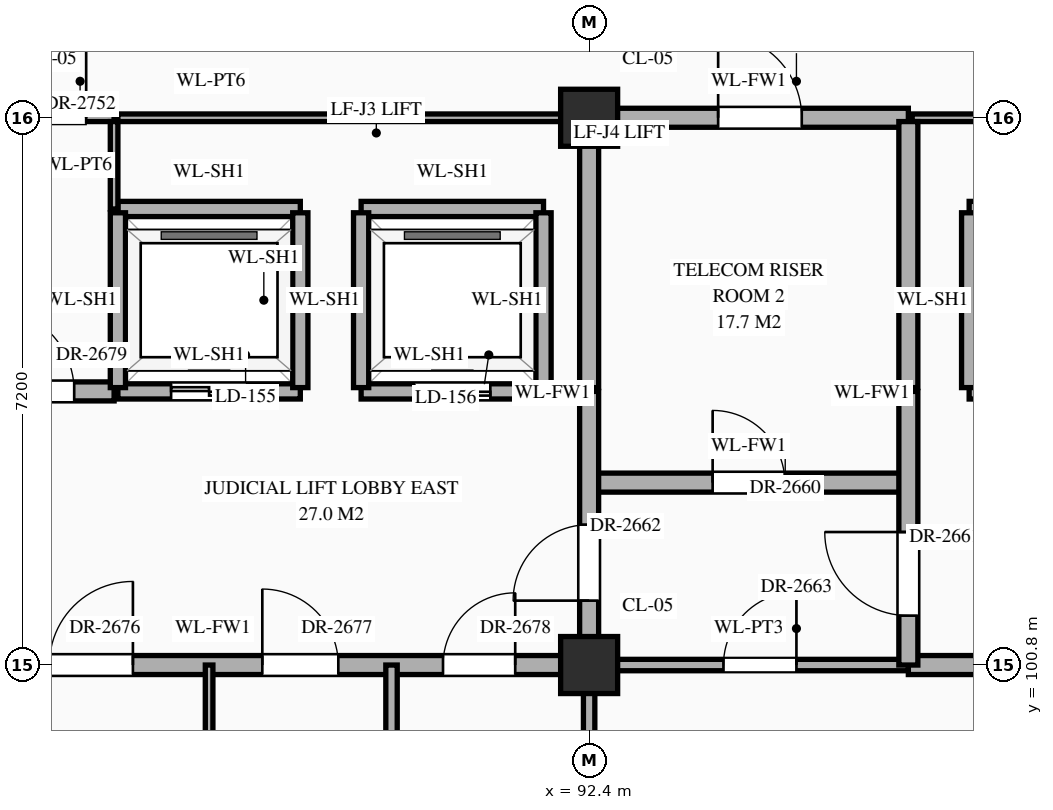
"""IFC4 building model, lengths in metres.
Left out: names, types, materials, properties, quantities, classifications, styles, units other than length and angle.
Written with IfcOpenShell. Run it as: python <this file> out.ifc"""

import sys

from ifc_helpers import new_model, si_unit, direction, frame, frame_2d, origin, origin_2d, place, context, subcontext, project, spatial, rectangle, extrude, element, fill, save


model = new_model("IFC4")
c1 = context("Model", 3, precision=1e-05, world=origin(), true_north=direction((0.0, 1.0)))
c2 = subcontext(c1, "Body", "Model", "MODEL_VIEW")
j1 = project(units=[si_unit("LENGTHUNIT", "METRE"), si_unit("PLANEANGLEUNIT", "RADIAN")], contexts=[c1])
p1 = place(None, origin())
s1 = spatial("IfcSite", under=j1, at=p1, CompositionType="ELEMENT")
p2 = place(p1, origin())
s2 = spatial("IfcBuilding", under=s1, at=p2, CompositionType="ELEMENT")
p3 = place(p2, frame((0.0, 0.0, 39.3)))
s3 = spatial("IfcBuildingStorey", under=s2, at=p3, CompositionType="ELEMENT", Elevation=39.3)
for number, where, z_axis, x_axis in (
    (1, (92.4, 100.8, 0.0), (0.0, 0.0, 1.0), (1.0, 0.0, 0.0)),
    (2, (92.4, 108.0, 0.0), (0.0, 0.0, 1.0), (1.0, 0.0, 0.0)),
):
    element("IfcColumn", number, at=place(p3, frame(where, z_axis=z_axis, x_axis=x_axis)), inside=s3, PredefinedType="COLUMN", context=c2, shape_type="SweptSolid", body=[
        extrude(rectangle(XDim=0.75, YDim=0.75, at=origin_2d()), origin(), (0.0, 0.0, 1.0), 4.2),
    ])
p4 = place(p3, frame((75.6, 100.8, 0.0), z_axis=(0.0, 0.0, 1.0), x_axis=(1.0, 0.0, 0.0)))
e3 = element("IfcWall", 3, at=p4, inside=s3, PredefinedType="STANDARD", context=c2, shape_type="SweptSolid", body=[
    extrude(rectangle(XDim=16.8, YDim=0.25, at=frame_2d((8.4, 0.0))), origin(), (0.0, 0.0, 1.0), 3.1),
])
p5 = place(p4, frame((3.7, 0.0, 0.0)))
e4 = element("IfcOpeningElement", 4, at=p5, cuts=e3, PredefinedType="OPENING", context=c2, shape_type="SweptSolid", body=[
    extrude(rectangle(XDim=1.0, YDim=2.2, at=frame_2d((0.5, 1.1))), frame((0.0, 0.137, 0.0), z_axis=(0.0, -1.0, 0.0), x_axis=(1.0, 0.0, 0.0)), (0.0, 0.0, 1.0), 0.274),
])
p6 = place(p4, frame((9.698, 0.0, 0.0)))
e5 = element("IfcOpeningElement", 5, at=p6, cuts=e3, PredefinedType="OPENING", context=c2, shape_type="SweptSolid", body=[
    extrude(rectangle(XDim=1.1, YDim=2.2, at=frame_2d((0.55, 1.1))), frame((0.0, 0.137, 0.0), z_axis=(0.0, -1.0, 0.0), x_axis=(1.0, 0.0, 0.0)), (0.0, 0.0, 1.0), 0.274),
])
p7 = place(p4, frame((12.5, 0.0, 0.0)))
e6 = element("IfcOpeningElement", 6, at=p7, cuts=e3, PredefinedType="OPENING", context=c2, shape_type="SweptSolid", body=[
    extrude(rectangle(XDim=1.0, YDim=2.2, at=frame_2d((0.5, 1.1))), frame((0.0, 0.137, 0.0), z_axis=(0.0, -1.0, 0.0), x_axis=(1.0, 0.0, 0.0)), (0.0, 0.0, 1.0), 0.274),
])
p8 = place(p4, frame((14.877, 0.0, 0.0)))
e7 = element("IfcOpeningElement", 7, at=p8, cuts=e3, PredefinedType="OPENING", context=c2, shape_type="SweptSolid", body=[
    extrude(rectangle(XDim=0.95, YDim=2.15, at=frame_2d((0.475, 1.075))), frame((0.0, 0.137, 0.0), z_axis=(0.0, -1.0, 0.0), x_axis=(1.0, 0.0, 0.0)), (0.0, 0.0, 1.0), 0.274),
])
p9 = place(p3, frame((92.4, 100.8, 0.0), z_axis=(0.0, 0.0, 1.0), x_axis=(1.0, 0.0, 0.0)))
e8 = element("IfcWall", 8, at=p9, inside=s3, PredefinedType="STANDARD", context=c2, shape_type="SweptSolid", body=[
    extrude(rectangle(XDim=4.2, YDim=0.15, at=frame_2d((2.1, 0.0))), origin(), (0.0, 0.0, 1.0), 3.1),
])
p10 = place(p9, frame((1.768, 0.0, 0.0)))
e9 = element("IfcOpeningElement", 9, at=p10, cuts=e8, PredefinedType="OPENING", context=c2, shape_type="SweptSolid", body=[
    extrude(rectangle(XDim=0.96, YDim=2.2, at=frame_2d((0.48, 1.1))), frame((0.0, 0.087, 0.0), z_axis=(0.0, -1.0, 0.0), x_axis=(1.0, 0.0, 0.0)), (0.0, 0.0, 1.0), 0.174),
])
p11 = place(p3, frame((96.6, 100.8, 0.0), z_axis=(0.0, 0.0, 1.0), x_axis=(1.0, 0.0, 0.0)))
e10 = element("IfcWall", 10, at=p11, inside=s3, PredefinedType="STANDARD", context=c2, shape_type="SweptSolid", body=[
    extrude(rectangle(XDim=12.6, YDim=0.25, at=frame_2d((6.3, 0.0))), origin(), (0.0, 0.0, 1.0), 3.1),
])
p12 = place(p11, frame((7.9, 0.0, 0.0)))
e11 = element("IfcOpeningElement", 11, at=p12, cuts=e10, PredefinedType="OPENING", context=c2, shape_type="SweptSolid", body=[
    extrude(rectangle(XDim=1.0, YDim=2.2, at=frame_2d((0.5, 1.1))), frame((0.0, 0.137, 0.0), z_axis=(0.0, -1.0, 0.0), x_axis=(1.0, 0.0, 0.0)), (0.0, 0.0, 1.0), 0.274),
])
p13 = place(p3, frame((92.4, 103.2, 0.0), z_axis=(0.0, 0.0, 1.0), x_axis=(1.0, 0.0, 0.0)))
e12 = element("IfcWall", 12, at=p13, inside=s3, PredefinedType="STANDARD", context=c2, shape_type="SweptSolid", body=[
    extrude(rectangle(XDim=4.2, YDim=0.25, at=frame_2d((2.1, 0.0))), origin(), (0.0, 0.0, 1.0), 3.95),
])
p14 = place(p13, frame((1.625, 0.0, 0.0)))
e13 = element("IfcOpeningElement", 13, at=p14, cuts=e12, PredefinedType="OPENING", context=c2, shape_type="SweptSolid", body=[
    extrude(rectangle(XDim=0.95, YDim=2.15, at=frame_2d((0.475, 1.075))), frame((0.0, 0.137, 0.0), z_axis=(0.0, -1.0, 0.0), x_axis=(1.0, 0.0, 0.0)), (0.0, 0.0, 1.0), 0.274),
])
p15 = place(p3, frame((81.85, 104.4, 0.0), z_axis=(0.0, 0.0, 1.0), x_axis=(1.0, 0.0, 0.0)))
e14 = element("IfcWall", 14, at=p15, inside=s3, PredefinedType="STANDARD", context=c2, shape_type="SweptSolid", body=[
    extrude(rectangle(XDim=4.3, YDim=0.25, at=frame_2d((2.15, 0.0))), origin(), (0.0, 0.0, 1.0), 3.95),
])
p16 = place(p15, frame((0.6, 0.0, 0.0)))
e15 = element("IfcOpeningElement", 15, at=p16, cuts=e14, PredefinedType="OPENING", context=c2, shape_type="SweptSolid", body=[
    extrude(rectangle(XDim=0.95, YDim=2.15, at=frame_2d((0.475, 1.075))), frame((0.0, 0.137, 0.0), z_axis=(0.0, -1.0, 0.0), x_axis=(1.0, 0.0, 0.0)), (0.0, 0.0, 1.0), 0.274),
])
p17 = place(p15, frame((2.675, 0.0, 0.0)))
e16 = element("IfcOpeningElement", 16, at=p17, cuts=e14, PredefinedType="OPENING", context=c2, shape_type="SweptSolid", body=[
    extrude(rectangle(XDim=1.1, YDim=2.2, at=frame_2d((0.55, 1.1))), frame((0.0, 0.137, 0.0), z_axis=(0.0, -1.0, 0.0), x_axis=(1.0, 0.0, 0.0)), (0.0, 0.0, 1.0), 0.274),
])
p18 = place(p3, frame((86.2, 104.4, 0.0), z_axis=(0.0, 0.0, 1.0), x_axis=(1.0, 0.0, 0.0)))
e17 = element("IfcWall", 17, at=p18, inside=s3, PredefinedType="STANDARD", context=c2, shape_type="SweptSolid", body=[
    extrude(rectangle(XDim=2.4, YDim=0.2, at=frame_2d((1.2, 0.0))), origin(), (0.0, 0.0, 1.0), 3.95),
])
p19 = place(p18, frame((0.7, 0.0, 0.0)))
e18 = element("IfcOpeningElement", 18, at=p19, cuts=e17, PredefinedType="OPENING", context=c2, shape_type="SweptSolid", body=[
    extrude(rectangle(XDim=1.0, YDim=2.15, at=frame_2d((0.5, 1.075))), frame((0.0, 0.112, 0.0), z_axis=(0.0, -1.0, 0.0), x_axis=(1.0, 0.0, 0.0)), (0.0, 0.0, 1.0), 0.224),
])
p20 = place(p3, frame((89.4, 104.4, 0.0), z_axis=(0.0, 0.0, 1.0), x_axis=(1.0, 0.0, 0.0)))
e19 = element("IfcWall", 19, at=p20, inside=s3, PredefinedType="STANDARD", context=c2, shape_type="SweptSolid", body=[
    extrude(rectangle(XDim=2.4, YDim=0.2, at=frame_2d((1.2, 0.0))), origin(), (0.0, 0.0, 1.0), 3.95),
])
p21 = place(p20, frame((0.7, 0.0, 0.0)))
e20 = element("IfcOpeningElement", 20, at=p21, cuts=e19, PredefinedType="OPENING", context=c2, shape_type="SweptSolid", body=[
    extrude(rectangle(XDim=1.0, YDim=2.15, at=frame_2d((0.5, 1.075))), frame((0.0, 0.112, 0.0), z_axis=(0.0, -1.0, 0.0), x_axis=(1.0, 0.0, 0.0)), (0.0, 0.0, 1.0), 0.224),
])
p22 = place(p3, frame((97.4, 104.4, 0.0), z_axis=(0.0, 0.0, 1.0), x_axis=(1.0, 0.0, 0.0)))
e21 = element("IfcWall", 21, at=p22, inside=s3, PredefinedType="STANDARD", context=c2, shape_type="SweptSolid", body=[
    extrude(rectangle(XDim=3.0, YDim=0.2, at=frame_2d((1.5, 0.0))), origin(), (0.0, 0.0, 1.0), 3.95),
])
p23 = place(p22, frame((0.9, 0.0, 0.0)))
e22 = element("IfcOpeningElement", 22, at=p23, cuts=e21, PredefinedType="OPENING", context=c2, shape_type="SweptSolid", body=[
    extrude(rectangle(XDim=1.2, YDim=2.15, at=frame_2d((0.6, 1.075))), frame((0.0, 0.112, 0.0), z_axis=(0.0, -1.0, 0.0), x_axis=(1.0, 0.0, 0.0)), (0.0, 0.0, 1.0), 0.224),
])
for number, where, z_axis, x_axis in (
    (23, (86.2, 106.8, 0.0), (0.0, 0.0, 1.0), (1.0, 0.0, 0.0)),
    (24, (89.4, 106.8, 0.0), (0.0, 0.0, 1.0), (1.0, 0.0, 0.0)),
):
    element("IfcWall", number, at=place(p3, frame(where, z_axis=z_axis, x_axis=x_axis)), inside=s3, PredefinedType="STANDARD", context=c2, shape_type="SweptSolid", body=[
        extrude(rectangle(XDim=2.4, YDim=0.2, at=frame_2d((1.2, 0.0))), origin(), (0.0, 0.0, 1.0), 3.95),
    ])
p24 = place(p3, frame((97.4, 106.8, 0.0), z_axis=(0.0, 0.0, 1.0), x_axis=(1.0, 0.0, 0.0)))
e25 = element("IfcWall", 25, at=p24, inside=s3, PredefinedType="STANDARD", context=c2, shape_type="SweptSolid", body=[
    extrude(rectangle(XDim=3.0, YDim=0.2, at=frame_2d((1.5, 0.0))), origin(), (0.0, 0.0, 1.0), 3.95),
])
p25 = place(p3, frame((81.85, 108.0, 0.0), z_axis=(0.0, 0.0, 1.0), x_axis=(1.0, 0.0, 0.0)))
e26 = element("IfcWall", 26, at=p25, inside=s3, PredefinedType="STANDARD", context=c2, shape_type="SweptSolid", body=[
    extrude(rectangle(XDim=4.3, YDim=0.1, at=frame_2d((2.15, 0.0))), origin(), (0.0, 0.0, 1.0), 3.1),
])
p26 = place(p25, frame((0.387, 0.0, 0.0)))
e27 = element("IfcOpeningElement", 27, at=p26, cuts=e26, PredefinedType="OPENING", context=c2, shape_type="SweptSolid", body=[
    extrude(rectangle(XDim=1.08, YDim=2.25, at=frame_2d((0.54, 1.125))), frame((0.0, 0.062, 0.0), z_axis=(0.0, -1.0, 0.0), x_axis=(1.0, 0.0, 0.0)), (0.0, 0.0, 1.0), 0.124),
])
p27 = place(p25, frame((2.812, 0.0, 0.0)))
e28 = element("IfcOpeningElement", 28, at=p27, cuts=e26, PredefinedType="OPENING", context=c2, shape_type="SweptSolid", body=[
    extrude(rectangle(XDim=1.12, YDim=2.25, at=frame_2d((0.56, 1.125))), frame((0.0, 0.062, 0.0), z_axis=(0.0, -1.0, 0.0), x_axis=(1.0, 0.0, 0.0)), (0.0, 0.0, 1.0), 0.124),
])
p28 = place(p3, frame((86.2, 108.0, 0.0), z_axis=(0.0, 0.0, 1.0), x_axis=(1.0, 0.0, 0.0)))
e29 = element("IfcWall", 29, at=p28, inside=s3, PredefinedType="STANDARD", context=c2, shape_type="SweptSolid", body=[
    extrude(rectangle(XDim=6.15, YDim=0.1, at=frame_2d((3.075, 0.0))), origin(), (0.0, 0.0, 1.0), 3.1),
])
p29 = place(p3, frame((92.4, 108.0, 0.0), z_axis=(0.0, 0.0, 1.0), x_axis=(1.0, 0.0, 0.0)))
e30 = element("IfcWall", 30, at=p29, inside=s3, PredefinedType="STANDARD", context=c2, shape_type="SweptSolid", body=[
    extrude(rectangle(XDim=4.2, YDim=0.25, at=frame_2d((2.1, 0.0))), origin(), (0.0, 0.0, 1.0), 3.1),
])
p30 = place(p29, frame((1.698, 0.0, 0.0)))
e31 = element("IfcOpeningElement", 31, at=p30, cuts=e30, PredefinedType="OPENING", context=c2, shape_type="SweptSolid", body=[
    extrude(rectangle(XDim=1.1, YDim=2.2, at=frame_2d((0.55, 1.1))), frame((0.0, 0.137, 0.0), z_axis=(0.0, -1.0, 0.0), x_axis=(1.0, 0.0, 0.0)), (0.0, 0.0, 1.0), 0.274),
])
p31 = place(p3, frame((96.65, 108.0, 0.0), z_axis=(0.0, 0.0, 1.0), x_axis=(1.0, 0.0, 0.0)))
e32 = element("IfcWall", 32, at=p31, inside=s3, PredefinedType="STANDARD", context=c2, shape_type="SweptSolid", body=[
    extrude(rectangle(XDim=4.1, YDim=0.1, at=frame_2d((2.05, 0.0))), origin(), (0.0, 0.0, 1.0), 3.1),
])
p32 = place(p3, frame((86.15, 106.8, 0.0), z_axis=(0.0, 0.0, 1.0), x_axis=(0.0, 1.0, 0.0)))
e33 = element("IfcWall", 33, at=p32, inside=s3, PredefinedType="STANDARD", context=c2, shape_type="SweptSolid", body=[
    extrude(rectangle(XDim=1.15, YDim=0.1, at=frame_2d((0.575, 0.0))), origin(), (0.0, 0.0, 1.0), 3.95),
])
p33 = place(p3, frame((86.2, 104.45, 0.0), z_axis=(0.0, 0.0, 1.0), x_axis=(0.0, 1.0, 0.0)))
e34 = element("IfcWall", 34, at=p33, inside=s3, PredefinedType="STANDARD", context=c2, shape_type="SweptSolid", body=[
    extrude(rectangle(XDim=2.3, YDim=0.2, at=frame_2d((1.15, 0.0))), origin(), (0.0, 0.0, 1.0), 3.95),
])
p34 = place(p3, frame((87.4, 96.0, 0.0), z_axis=(0.0, 0.0, 1.0), x_axis=(0.0, 1.0, 0.0)))
e35 = element("IfcWall", 35, at=p34, inside=s3, PredefinedType="STANDARD", context=c2, shape_type="SweptSolid", body=[
    extrude(rectangle(XDim=4.8, YDim=0.1, at=frame_2d((2.4, 0.0))), origin(), (0.0, 0.0, 1.0), 3.95),
])
p35 = place(p34, frame((1.92, 0.0, 0.0)))
e36 = element("IfcOpeningElement", 36, at=p35, cuts=e35, PredefinedType="OPENING", context=c2, shape_type="SweptSolid", body=[
    extrude(rectangle(XDim=0.96, YDim=2.2, at=frame_2d((0.48, 1.1))), frame((0.0, 0.062, 0.0), z_axis=(0.0, -1.0, 0.0), x_axis=(1.0, 0.0, 0.0)), (0.0, 0.0, 1.0), 0.124),
])
for number, where, z_axis, x_axis in (
    (37, (88.6, 104.45, 0.0), (0.0, 0.0, 1.0), (0.0, 1.0, 0.0)),
    (38, (89.4, 104.45, 0.0), (0.0, 0.0, 1.0), (0.0, 1.0, 0.0)),
):
    element("IfcWall", number, at=place(p3, frame(where, z_axis=z_axis, x_axis=x_axis)), inside=s3, PredefinedType="STANDARD", context=c2, shape_type="SweptSolid", body=[
        extrude(rectangle(XDim=2.3, YDim=0.2, at=frame_2d((1.15, 0.0))), origin(), (0.0, 0.0, 1.0), 3.95),
    ])
p36 = place(p3, frame((89.8, 96.0, 0.0), z_axis=(0.0, 0.0, 1.0), x_axis=(0.0, 1.0, 0.0)))
e39 = element("IfcWall", 39, at=p36, inside=s3, PredefinedType="STANDARD", context=c2, shape_type="SweptSolid", body=[
    extrude(rectangle(XDim=4.8, YDim=0.15, at=frame_2d((2.4, 0.0))), origin(), (0.0, 0.0, 1.0), 3.95),
])
p37 = place(p36, frame((1.9, 0.0, 0.0)))
e40 = element("IfcOpeningElement", 40, at=p37, cuts=e39, PredefinedType="OPENING", context=c2, shape_type="SweptSolid", body=[
    extrude(rectangle(XDim=1.0, YDim=2.25, at=frame_2d((0.5, 1.125))), frame((0.0, 0.087, 0.0), z_axis=(0.0, -1.0, 0.0), x_axis=(1.0, 0.0, 0.0)), (0.0, 0.0, 1.0), 0.174),
])
p38 = place(p3, frame((91.8, 104.45, 0.0), z_axis=(0.0, 0.0, 1.0), x_axis=(0.0, 1.0, 0.0)))
e41 = element("IfcWall", 41, at=p38, inside=s3, PredefinedType="STANDARD", context=c2, shape_type="SweptSolid", body=[
    extrude(rectangle(XDim=2.3, YDim=0.2, at=frame_2d((1.15, 0.0))), origin(), (0.0, 0.0, 1.0), 3.95),
])
p39 = place(p3, frame((92.4, 96.0, 0.0), z_axis=(0.0, 0.0, 1.0), x_axis=(0.0, 1.0, 0.0)))
e42 = element("IfcWall", 42, at=p39, inside=s3, PredefinedType="STANDARD", context=c2, shape_type="SweptSolid", body=[
    extrude(rectangle(XDim=4.8, YDim=0.15, at=frame_2d((2.4, 0.0))), origin(), (0.0, 0.0, 1.0), 3.2),
])
p40 = place(p3, frame((92.4, 100.8, 0.0), z_axis=(0.0, 0.0, 1.0), x_axis=(0.0, 1.0, 0.0)))
e43 = element("IfcWall", 43, at=p40, inside=s3, PredefinedType="STANDARD", context=c2, shape_type="SweptSolid", body=[
    extrude(rectangle(XDim=3.6, YDim=0.25, at=frame_2d((1.8, 0.0))), origin(), (0.0, 0.0, 1.0), 3.2),
])
p41 = place(p40, frame((0.847, 0.0, 0.0)))
e44 = element("IfcOpeningElement", 44, at=p41, cuts=e43, PredefinedType="OPENING", context=c2, shape_type="SweptSolid", body=[
    extrude(rectangle(XDim=1.0, YDim=2.2, at=frame_2d((0.5, 1.1))), frame((0.0, 0.137, 0.0), z_axis=(0.0, -1.0, 0.0), x_axis=(1.0, 0.0, 0.0)), (0.0, 0.0, 1.0), 0.274),
])
p42 = place(p3, frame((92.4, 104.45, 0.0), z_axis=(0.0, 0.0, 1.0), x_axis=(0.0, 1.0, 0.0)))
e45 = element("IfcWall", 45, at=p42, inside=s3, PredefinedType="STANDARD", context=c2, shape_type="SweptSolid", body=[
    extrude(rectangle(XDim=3.5, YDim=0.25, at=frame_2d((1.75, 0.0))), origin(), (0.0, 0.0, 1.0), 3.2),
])
p43 = place(p3, frame((96.6, 100.8, 0.0), z_axis=(0.0, 0.0, 1.0), x_axis=(0.0, 1.0, 0.0)))
e46 = element("IfcWall", 46, at=p43, inside=s3, PredefinedType="STANDARD", context=c2, shape_type="SweptSolid", body=[
    extrude(rectangle(XDim=3.6, YDim=0.25, at=frame_2d((1.8, 0.0))), origin(), (0.0, 0.0, 1.0), 3.95),
])
p44 = place(p43, frame((0.65, 0.0, 0.0)))
e47 = element("IfcOpeningElement", 47, at=p44, cuts=e46, PredefinedType="OPENING", context=c2, shape_type="SweptSolid", body=[
    extrude(rectangle(XDim=1.1, YDim=2.2, at=frame_2d((0.55, 1.1))), frame((0.0, 0.137, 0.0), z_axis=(0.0, -1.0, 0.0), x_axis=(1.0, 0.0, 0.0)), (0.0, 0.0, 1.0), 0.274),
])
p45 = place(p3, frame((96.6, 104.45, 0.0), z_axis=(0.0, 0.0, 1.0), x_axis=(0.0, 1.0, 0.0)))
e48 = element("IfcWall", 48, at=p45, inside=s3, PredefinedType="STANDARD", context=c2, shape_type="SweptSolid", body=[
    extrude(rectangle(XDim=3.5, YDim=0.25, at=frame_2d((1.75, 0.0))), origin(), (0.0, 0.0, 1.0), 3.95),
])
p46 = place(p3, frame((97.4, 104.45, 0.0), z_axis=(0.0, 0.0, 1.0), x_axis=(0.0, 1.0, 0.0)))
e49 = element("IfcWall", 49, at=p46, inside=s3, PredefinedType="STANDARD", context=c2, shape_type="SweptSolid", body=[
    extrude(rectangle(XDim=2.3, YDim=0.2, at=frame_2d((1.15, 0.0))), origin(), (0.0, 0.0, 1.0), 3.95),
])
p47 = place(p19, origin())
e50 = element("IfcDoor", 50, at=p47, inside=s3, OperationType="DOUBLE_DOOR_SLIDING", PredefinedType="DOOR", context=c2, shape_type="SweptSolid", body=[
    extrude(rectangle(XDim=1.0, YDim=2.15, at=frame_2d((0.5, 1.075))), frame((0.0, 0.025, 0.0), z_axis=(0.0, -1.0, 0.0), x_axis=(1.0, 0.0, 0.0)), (0.0, 0.0, 1.0), 0.05),
])
fill(e18, e50)
p48 = place(p21, origin())
e51 = element("IfcDoor", 51, at=p48, inside=s3, OperationType="DOUBLE_DOOR_SLIDING", PredefinedType="DOOR", context=c2, shape_type="SweptSolid", body=[
    extrude(rectangle(XDim=1.0, YDim=2.15, at=frame_2d((0.5, 1.075))), frame((0.0, 0.025, 0.0), z_axis=(0.0, -1.0, 0.0), x_axis=(1.0, 0.0, 0.0)), (0.0, 0.0, 1.0), 0.05),
])
fill(e20, e51)
p49 = place(p14, origin())
e52 = element("IfcDoor", 52, at=p49, inside=s3, OperationType="SINGLE_SWING_LEFT", PredefinedType="DOOR", context=c2, shape_type="SweptSolid", body=[
    extrude(rectangle(XDim=0.95, YDim=2.15, at=frame_2d((0.475, 1.075))), frame((0.0, 0.025, 0.0), z_axis=(0.0, -1.0, 0.0), x_axis=(1.0, 0.0, 0.0)), (0.0, 0.0, 1.0), 0.05),
])
fill(e13, e52)
p50 = place(p44, origin())
e53 = element("IfcDoor", 53, at=p50, inside=s3, OperationType="SINGLE_SWING_RIGHT", PredefinedType="DOOR", context=c2, shape_type="SweptSolid", body=[
    extrude(rectangle(XDim=1.1, YDim=2.2, at=frame_2d((0.55, 1.1))), frame((0.0, 0.025, 0.0), z_axis=(0.0, -1.0, 0.0), x_axis=(1.0, 0.0, 0.0)), (0.0, 0.0, 1.0), 0.05),
])
fill(e47, e53)
p51 = place(p41, origin())
e54 = element("IfcDoor", 54, at=p51, inside=s3, OperationType="SINGLE_SWING_LEFT", PredefinedType="DOOR", context=c2, shape_type="SweptSolid", body=[
    extrude(rectangle(XDim=1.0, YDim=2.2, at=frame_2d((0.5, 1.1))), frame((0.0, 0.025, 0.0), z_axis=(0.0, -1.0, 0.0), x_axis=(1.0, 0.0, 0.0)), (0.0, 0.0, 1.0), 0.05),
])
fill(e44, e54)
p52 = place(p10, origin())
e55 = element("IfcDoor", 55, at=p52, inside=s3, OperationType="SINGLE_SWING_RIGHT", PredefinedType="DOOR", context=c2, shape_type="SweptSolid", body=[
    extrude(rectangle(XDim=0.96, YDim=2.2, at=frame_2d((0.48, 1.1))), frame((0.0, 0.025, 0.0), z_axis=(0.0, -1.0, 0.0), x_axis=(1.0, 0.0, 0.0)), (0.0, 0.0, 1.0), 0.05),
])
fill(e9, e55)
p53 = place(p30, origin())
e56 = element("IfcDoor", 56, at=p53, inside=s3, OperationType="SINGLE_SWING_LEFT", PredefinedType="DOOR", context=c2, shape_type="SweptSolid", body=[
    extrude(rectangle(XDim=1.1, YDim=2.2, at=frame_2d((0.55, 1.1))), frame((0.0, 0.025, 0.0), z_axis=(0.0, -1.0, 0.0), x_axis=(1.0, 0.0, 0.0)), (0.0, 0.0, 1.0), 0.05),
])
fill(e31, e56)
p54 = place(p6, origin())
e57 = element("IfcDoor", 57, at=p54, inside=s3, OperationType="SINGLE_SWING_RIGHT", PredefinedType="DOOR", context=c2, shape_type="SweptSolid", body=[
    extrude(rectangle(XDim=1.1, YDim=2.2, at=frame_2d((0.55, 1.1))), frame((0.0, 0.025, 0.0), z_axis=(0.0, -1.0, 0.0), x_axis=(1.0, 0.0, 0.0)), (0.0, 0.0, 1.0), 0.05),
])
fill(e5, e57)
p55 = place(p7, origin())
e58 = element("IfcDoor", 58, at=p55, inside=s3, OperationType="SINGLE_SWING_LEFT", PredefinedType="DOOR", context=c2, shape_type="SweptSolid", body=[
    extrude(rectangle(XDim=1.0, YDim=2.2, at=frame_2d((0.5, 1.1))), frame((0.0, 0.025, 0.0), z_axis=(0.0, -1.0, 0.0), x_axis=(1.0, 0.0, 0.0)), (0.0, 0.0, 1.0), 0.05),
])
fill(e6, e58)
p56 = place(p8, origin())
e59 = element("IfcDoor", 59, at=p56, inside=s3, OperationType="SINGLE_SWING_RIGHT", PredefinedType="DOOR", context=c2, shape_type="SweptSolid", body=[
    extrude(rectangle(XDim=0.95, YDim=2.15, at=frame_2d((0.475, 1.075))), frame((0.0, 0.025, 0.0), z_axis=(0.0, -1.0, 0.0), x_axis=(1.0, 0.0, 0.0)), (0.0, 0.0, 1.0), 0.05),
])
fill(e7, e59)
p57 = place(p17, origin())
e60 = element("IfcDoor", 60, at=p57, inside=s3, OperationType="SINGLE_SWING_LEFT", PredefinedType="DOOR", context=c2, shape_type="SweptSolid", body=[
    extrude(rectangle(XDim=1.1, YDim=2.2, at=frame_2d((0.55, 1.1))), frame((0.0, 0.025, 0.0), z_axis=(0.0, -1.0, 0.0), x_axis=(1.0, 0.0, 0.0)), (0.0, 0.0, 1.0), 0.05),
])
fill(e16, e60)
p58 = place(p27, origin())
e61 = element("IfcDoor", 61, at=p58, inside=s3, OperationType="SINGLE_SWING_RIGHT", PredefinedType="DOOR", context=c2, shape_type="SweptSolid", body=[
    extrude(rectangle(XDim=1.12, YDim=2.25, at=frame_2d((0.56, 1.125))), frame((0.0, 0.025, 0.0), z_axis=(0.0, -1.0, 0.0), x_axis=(1.0, 0.0, 0.0)), (0.0, 0.0, 1.0), 0.05),
])
fill(e28, e61)
save(model, sys.argv[1])
